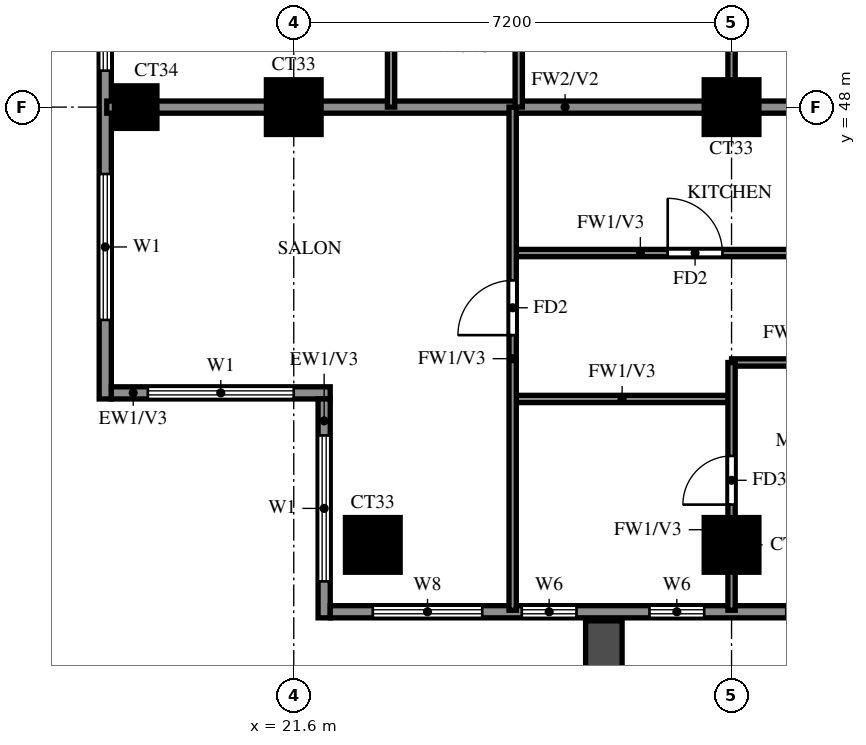
"""IFC4 building model, lengths in metres.
Left out: names, types, materials, properties, quantities, classifications, styles, units other than length and angle.
Written with IfcOpenShell. Run it as: python <this file> out.ifc"""

import sys

from ifc_helpers import new_model, si_unit, direction, frame, frame_2d, origin, origin_2d, place, context, subcontext, project, spatial, rectangle, extrude, source, transform, mapped, element, fill, save


model = new_model("IFC4")
c1 = context("Model", 3, precision=1e-05, world=origin(), true_north=direction((0.0, 1.0)))
c2 = subcontext(c1, "Body", "Model", "MODEL_VIEW")
j1 = project(units=[si_unit("LENGTHUNIT", "METRE"), si_unit("PLANEANGLEUNIT", "RADIAN")], contexts=[c1])
p1 = place(None, origin())
s1 = spatial("IfcSite", under=j1, at=p1, CompositionType="ELEMENT")
p2 = place(p1, origin())
s2 = spatial("IfcBuilding", under=s1, at=p2, CompositionType="ELEMENT")
p3 = place(p2, frame((0.0, 0.0, 218.5)))
s3 = spatial("IfcBuildingStorey", under=s2, at=p3, CompositionType="ELEMENT", Elevation=218.5)
m1 = source(origin(), c2, "Body", "SweptSolid", [
    extrude(rectangle(XDim=0.9, YDim=0.9, at=origin_2d()), origin(), (0.0, 0.0, 1.0), 3.22),
])
for number, where, z_axis, x_axis in (
    (1, (22.9, 40.8, 0.0), (0.0, 0.0, 1.0), (1.0, 0.0, 0.0)),
    (2, (28.8, 40.8, 0.0), (0.0, 0.0, 1.0), (1.0, 0.0, 0.0)),
):
    element("IfcColumn", number, at=place(p3, frame(where, z_axis=z_axis, x_axis=x_axis)), inside=s3, PredefinedType="COLUMN", context=c2, shape_type="MappedRepresentation", body=[
        mapped(m1, transform((0.0, 0.0, 0.0))),
    ])
m2 = source(origin(), c2, "Body", "SweptSolid", [
    extrude(rectangle(XDim=0.7, YDim=0.7, at=origin_2d()), origin(), (0.0, 0.0, 1.0), 3.22),
])
p4 = place(p3, frame((19.0, 48.0, 0.0), z_axis=(0.0, 0.0, 1.0), x_axis=(1.0, 0.0, 0.0)))
e3 = element("IfcColumn", 3, at=p4, inside=s3, PredefinedType="COLUMN", context=c2, shape_type="MappedRepresentation", body=[
    mapped(m2, transform((0.0, 0.0, 0.0))),
])
for number, where, z_axis, x_axis in (
    (4, (21.6, 48.0, 0.0), (0.0, 0.0, 1.0), (1.0, 0.0, 0.0)),
    (5, (28.8, 48.0, 0.0), (0.0, 0.0, 1.0), (1.0, 0.0, 0.0)),
):
    element("IfcColumn", number, at=place(p3, frame(where, z_axis=z_axis, x_axis=x_axis)), inside=s3, PredefinedType="COLUMN", context=c2, shape_type="MappedRepresentation", body=[
        mapped(m1, transform((0.0, 0.0, 0.0))),
    ])
p5 = place(p3, frame((18.5, 76.6, 0.0), z_axis=(0.0, 0.0, 1.0), x_axis=(0.0, -1.0, 0.0)))
e6 = element("IfcWall", 6, at=p5, inside=s3, PredefinedType="SOLIDWALL", context=c2, shape_type="SweptSolid", body=[
    extrude(rectangle(XDim=33.4, YDim=0.2, at=frame_2d((16.7, 0.0))), origin(), (0.0, 0.0, 1.0), 3.22),
])
p6 = place(p5, frame((18.7, 0.0, 0.0)))
e7 = element("IfcOpeningElement", 7, at=p6, cuts=e6, PredefinedType="OPENING", context=c2, shape_type="SweptSolid", body=[
    extrude(rectangle(XDim=1.8, YDim=2.4, at=frame_2d((0.9, 1.2))), frame((0.0, 0.11, 0.0), z_axis=(0.0, -1.0, 0.0), x_axis=(1.0, 0.0, 0.0)), (0.0, 0.0, 1.0), 0.22),
])
p7 = place(p5, frame((29.7, 0.0, 0.6)))
e8 = element("IfcOpeningElement", 8, at=p7, cuts=e6, PredefinedType="OPENING", context=c2, shape_type="SweptSolid", body=[
    extrude(rectangle(XDim=2.4, YDim=2.4, at=frame_2d((1.2, 1.2))), frame((0.0, 0.11, 0.0), z_axis=(0.0, -1.0, 0.0), x_axis=(1.0, 0.0, 0.0)), (0.0, 0.0, 1.0), 0.22),
])
p8 = place(p5, frame((25.6, 0.0, 0.6)))
e9 = element("IfcOpeningElement", 9, at=p8, cuts=e6, PredefinedType="OPENING", context=c2, shape_type="SweptSolid", body=[
    extrude(rectangle(XDim=2.4, YDim=2.4, at=frame_2d((1.2, 1.2))), frame((0.0, 0.11, 0.0), z_axis=(0.0, -1.0, 0.0), x_axis=(1.0, 0.0, 0.0)), (0.0, 0.0, 1.0), 0.22),
])
p9 = place(p5, frame((21.7, 0.0, 0.6)))
e10 = element("IfcOpeningElement", 10, at=p9, cuts=e6, PredefinedType="OPENING", context=c2, shape_type="SweptSolid", body=[
    extrude(rectangle(XDim=1.2, YDim=2.4, at=frame_2d((0.6, 1.2))), frame((0.0, 0.11, 0.0), z_axis=(0.0, -1.0, 0.0), x_axis=(1.0, 0.0, 0.0)), (0.0, 0.0, 1.0), 0.22),
])
p10 = place(p5, frame((23.95, 0.0, 0.6)))
e11 = element("IfcOpeningElement", 11, at=p10, cuts=e6, PredefinedType="OPENING", context=c2, shape_type="SweptSolid", body=[
    extrude(rectangle(XDim=0.9, YDim=2.4, at=frame_2d((0.45, 1.2))), frame((0.0, 0.11, 0.0), z_axis=(0.0, -1.0, 0.0), x_axis=(1.0, 0.0, 0.0)), (0.0, 0.0, 1.0), 0.22),
])
p11 = place(p5, frame((14.5, 0.0, 0.6)))
e12 = element("IfcOpeningElement", 12, at=p11, cuts=e6, PredefinedType="OPENING", context=c2, shape_type="SweptSolid", body=[
    extrude(rectangle(XDim=1.8, YDim=2.4, at=frame_2d((0.9, 1.2))), frame((0.0, 0.11, 0.0), z_axis=(0.0, -1.0, 0.0), x_axis=(1.0, 0.0, 0.0)), (0.0, 0.0, 1.0), 0.22),
])
p12 = place(p5, frame((7.833, 0.0, 0.6)))
e13 = element("IfcOpeningElement", 13, at=p12, cuts=e6, PredefinedType="OPENING", context=c2, shape_type="SweptSolid", body=[
    extrude(rectangle(XDim=2.4, YDim=2.4, at=frame_2d((1.2, 1.2))), frame((0.0, 0.11, 0.0), z_axis=(0.0, -1.0, 0.0), x_axis=(1.0, 0.0, 0.0)), (0.0, 0.0, 1.0), 0.22),
])
p13 = place(p5, frame((10.967, 0.0, 0.6)))
e14 = element("IfcOpeningElement", 14, at=p13, cuts=e6, PredefinedType="OPENING", context=c2, shape_type="SweptSolid", body=[
    extrude(rectangle(XDim=2.4, YDim=2.4, at=frame_2d((1.2, 1.2))), frame((0.0, 0.11, 0.0), z_axis=(0.0, -1.0, 0.0), x_axis=(1.0, 0.0, 0.0)), (0.0, 0.0, 1.0), 0.22),
])
p14 = place(p5, frame((4.75, 0.0, 1.5)))
e15 = element("IfcOpeningElement", 15, at=p14, cuts=e6, PredefinedType="OPENING", context=c2, shape_type="SweptSolid", body=[
    extrude(rectangle(XDim=0.9, YDim=0.9, at=frame_2d((0.45, 0.45))), frame((0.0, 0.11, 0.0), z_axis=(0.0, -1.0, 0.0), x_axis=(1.0, 0.0, 0.0)), (0.0, 0.0, 1.0), 0.22),
])
p15 = place(p5, frame((0.6, 0.0, 0.6)))
e16 = element("IfcOpeningElement", 16, at=p15, cuts=e6, PredefinedType="OPENING", context=c2, shape_type="SweptSolid", body=[
    extrude(rectangle(XDim=2.4, YDim=2.4, at=frame_2d((1.2, 1.2))), frame((0.0, 0.11, 0.0), z_axis=(0.0, -1.0, 0.0), x_axis=(1.0, 0.0, 0.0)), (0.0, 0.0, 1.0), 0.22),
])
p16 = place(p3, frame((18.6, 43.3, 0.0), z_axis=(0.0, 0.0, 1.0), x_axis=(1.0, 0.0, 0.0)))
e17 = element("IfcWall", 17, at=p16, inside=s3, PredefinedType="SOLIDWALL", context=c2, shape_type="SweptSolid", body=[
    extrude(rectangle(XDim=3.6, YDim=0.2, at=frame_2d((1.8, 0.0))), origin(), (0.0, 0.0, 1.0), 3.22),
])
p17 = place(p16, frame((0.6, 0.0, 0.6)))
e18 = element("IfcOpeningElement", 18, at=p17, cuts=e17, PredefinedType="OPENING", context=c2, shape_type="SweptSolid", body=[
    extrude(rectangle(XDim=2.4, YDim=2.4, at=frame_2d((1.2, 1.2))), frame((0.0, 0.11, 0.0), z_axis=(0.0, -1.0, 0.0), x_axis=(1.0, 0.0, 0.0)), (0.0, 0.0, 1.0), 0.22),
])
p18 = place(p3, frame((22.1, 43.2, 0.0), z_axis=(0.0, 0.0, 1.0), x_axis=(0.0, -1.0, 0.0)))
e19 = element("IfcWall", 19, at=p18, inside=s3, PredefinedType="SOLIDWALL", context=c2, shape_type="SweptSolid", body=[
    extrude(rectangle(XDim=3.6, YDim=0.2, at=frame_2d((1.8, 0.0))), origin(), (0.0, 0.0, 1.0), 3.22),
])
p19 = place(p18, frame((0.6, 0.0, 0.6)))
e20 = element("IfcOpeningElement", 20, at=p19, cuts=e19, PredefinedType="OPENING", context=c2, shape_type="SweptSolid", body=[
    extrude(rectangle(XDim=2.4, YDim=2.4, at=frame_2d((1.2, 1.2))), frame((0.0, 0.11, 0.0), z_axis=(0.0, -1.0, 0.0), x_axis=(1.0, 0.0, 0.0)), (0.0, 0.0, 1.0), 0.22),
])
p20 = place(p3, frame((22.2, 39.7, 0.0), z_axis=(0.0, 0.0, 1.0), x_axis=(1.0, 0.0, 0.0)))
e21 = element("IfcWall", 21, at=p20, inside=s3, PredefinedType="SOLIDWALL", context=c2, shape_type="SweptSolid", body=[
    extrude(rectangle(XDim=19.8, YDim=0.2, at=frame_2d((9.9, 0.0))), origin(), (0.0, 0.0, 1.0), 3.22),
])
p21 = place(p20, frame((7.5, 0.0, 0.0)))
e22 = element("IfcOpeningElement", 22, at=p21, cuts=e21, PredefinedType="OPENING", context=c2, shape_type="SweptSolid", body=[
    extrude(rectangle(XDim=1.8, YDim=2.4, at=frame_2d((0.9, 1.2))), frame((0.0, 0.11, 0.0), z_axis=(0.0, -1.0, 0.0), x_axis=(1.0, 0.0, 0.0)), (0.0, 0.0, 1.0), 0.22),
])
p22 = place(p20, frame((0.7, 0.0, 0.6)))
e23 = element("IfcOpeningElement", 23, at=p22, cuts=e21, PredefinedType="OPENING", context=c2, shape_type="SweptSolid", body=[
    extrude(rectangle(XDim=1.8, YDim=2.4, at=frame_2d((0.9, 1.2))), frame((0.0, 0.11, 0.0), z_axis=(0.0, -1.0, 0.0), x_axis=(1.0, 0.0, 0.0)), (0.0, 0.0, 1.0), 0.22),
])
p23 = place(p20, frame((9.75, 0.0, 0.6)))
e24 = element("IfcOpeningElement", 24, at=p23, cuts=e21, PredefinedType="OPENING", context=c2, shape_type="SweptSolid", body=[
    extrude(rectangle(XDim=0.9, YDim=2.4, at=frame_2d((0.45, 1.2))), frame((0.0, 0.11, 0.0), z_axis=(0.0, -1.0, 0.0), x_axis=(1.0, 0.0, 0.0)), (0.0, 0.0, 1.0), 0.22),
])
p24 = place(p20, frame((3.15, 0.0, 1.5)))
e25 = element("IfcOpeningElement", 25, at=p24, cuts=e21, PredefinedType="OPENING", context=c2, shape_type="SweptSolid", body=[
    extrude(rectangle(XDim=0.9, YDim=0.9, at=frame_2d((0.45, 0.45))), frame((0.0, 0.11, 0.0), z_axis=(0.0, -1.0, 0.0), x_axis=(1.0, 0.0, 0.0)), (0.0, 0.0, 1.0), 0.22),
])
p25 = place(p20, frame((5.25, 0.0, 1.5)))
e26 = element("IfcOpeningElement", 26, at=p25, cuts=e21, PredefinedType="OPENING", context=c2, shape_type="SweptSolid", body=[
    extrude(rectangle(XDim=0.9, YDim=0.9, at=frame_2d((0.45, 0.45))), frame((0.0, 0.11, 0.0), z_axis=(0.0, -1.0, 0.0), x_axis=(1.0, 0.0, 0.0)), (0.0, 0.0, 1.0), 0.22),
])
p26 = place(p3, frame((26.7, 39.55, 0.0), z_axis=(0.0, 0.0, 1.0), x_axis=(0.0, -1.0, 0.0)))
e27 = element("IfcWall", 27, at=p26, inside=s3, PredefinedType="SOLIDWALL", context=c2, shape_type="SweptSolid", body=[
    extrude(rectangle(XDim=2.65, YDim=0.6, at=frame_2d((1.325, 0.0))), origin(), (0.0, 0.0, 1.0), 2.85),
])
p27 = place(p3, frame((18.525, 48.0, 0.0), z_axis=(0.0, 0.0, 1.0), x_axis=(1.0, 0.0, 0.0)))
e28 = element("IfcWall", 28, at=p27, inside=s3, PredefinedType="SOLIDWALL", context=c2, shape_type="SweptSolid", body=[
    extrude(rectangle(XDim=15.075, YDim=0.2, at=frame_2d((7.538, 0.0))), origin(), (0.0, 0.0, 1.0), 3.22),
])
p28 = place(p3, frame((25.2, 43.2, 0.0), z_axis=(0.0, 0.0, 1.0), x_axis=(1.0, 0.0, 0.0)))
e29 = element("IfcWall", 29, at=p28, inside=s3, PredefinedType="PARTITIONING", context=c2, shape_type="SweptSolid", body=[
    extrude(rectangle(XDim=3.6, YDim=0.12, at=frame_2d((1.8, 0.0))), origin(), (0.0, 0.0, 1.0), 3.22),
])
p29 = place(p3, frame((28.8, 43.8, 0.0), z_axis=(0.0, 0.0, 1.0), x_axis=(1.0, 0.0, 0.0)))
e30 = element("IfcWall", 30, at=p29, inside=s3, PredefinedType="PARTITIONING", context=c2, shape_type="SweptSolid", body=[
    extrude(rectangle(XDim=4.8, YDim=0.12, at=frame_2d((2.4, 0.0))), origin(), (0.0, 0.0, 1.0), 3.22),
])
p30 = place(p29, frame((1.95, 0.0, 0.0)))
e31 = element("IfcOpeningElement", 31, at=p30, cuts=e30, PredefinedType="OPENING", context=c2, shape_type="SweptSolid", body=[
    extrude(rectangle(XDim=0.9, YDim=2.1, at=frame_2d((0.45, 1.05))), frame((0.0, 0.07, 0.0), z_axis=(0.0, -1.0, 0.0), x_axis=(1.0, 0.0, 0.0)), (0.0, 0.0, 1.0), 0.14),
])
p31 = place(p3, frame((25.2, 45.6, 0.0), z_axis=(0.0, 0.0, 1.0), x_axis=(1.0, 0.0, 0.0)))
e32 = element("IfcWall", 32, at=p31, inside=s3, PredefinedType="PARTITIONING", context=c2, shape_type="SweptSolid", body=[
    extrude(rectangle(XDim=6.0, YDim=0.12, at=frame_2d((3.0, 0.0))), origin(), (0.0, 0.0, 1.0), 3.22),
])
p32 = place(p31, frame((2.55, 0.0, 0.0)))
e33 = element("IfcOpeningElement", 33, at=p32, cuts=e32, PredefinedType="OPENING", context=c2, shape_type="SweptSolid", body=[
    extrude(rectangle(XDim=0.9, YDim=2.1, at=frame_2d((0.45, 1.05))), frame((0.0, 0.07, 0.0), z_axis=(0.0, -1.0, 0.0), x_axis=(1.0, 0.0, 0.0)), (0.0, 0.0, 1.0), 0.14),
])
p33 = place(p3, frame((23.2, 48.0, 0.0), z_axis=(0.0, 0.0, 1.0), x_axis=(0.0, 1.0, 0.0)))
e34 = element("IfcWall", 34, at=p33, inside=s3, PredefinedType="PARTITIONING", context=c2, shape_type="SweptSolid", body=[
    extrude(rectangle(XDim=21.6, YDim=0.12, at=frame_2d((10.8, 0.0))), origin(), (0.0, 0.0, 1.0), 3.22),
])
p34 = place(p33, frame((1.35, 0.0, 0.0)))
e35 = element("IfcOpeningElement", 35, at=p34, cuts=e34, PredefinedType="OPENING", context=c2, shape_type="SweptSolid", body=[
    extrude(rectangle(XDim=0.9, YDim=2.1, at=frame_2d((0.45, 1.05))), frame((0.0, 0.07, 0.0), z_axis=(0.0, -1.0, 0.0), x_axis=(1.0, 0.0, 0.0)), (0.0, 0.0, 1.0), 0.14),
])
p35 = place(p33, frame((4.95, 0.0, 0.0)))
e36 = element("IfcOpeningElement", 36, at=p35, cuts=e34, PredefinedType="OPENING", context=c2, shape_type="SweptSolid", body=[
    extrude(rectangle(XDim=0.9, YDim=2.1, at=frame_2d((0.45, 1.05))), frame((0.0, 0.07, 0.0), z_axis=(0.0, -1.0, 0.0), x_axis=(1.0, 0.0, 0.0)), (0.0, 0.0, 1.0), 0.14),
])
p36 = place(p33, frame((8.25, 0.0, 0.0)))
e37 = element("IfcOpeningElement", 37, at=p36, cuts=e34, PredefinedType="OPENING", context=c2, shape_type="SweptSolid", body=[
    extrude(rectangle(XDim=1.5, YDim=2.1, at=frame_2d((0.75, 1.05))), frame((0.0, 0.07, 0.0), z_axis=(0.0, -1.0, 0.0), x_axis=(1.0, 0.0, 0.0)), (0.0, 0.0, 1.0), 0.14),
])
p37 = place(p33, frame((12.15, 0.0, 0.0)))
e38 = element("IfcOpeningElement", 38, at=p37, cuts=e34, PredefinedType="OPENING", context=c2, shape_type="SweptSolid", body=[
    extrude(rectangle(XDim=0.9, YDim=2.1, at=frame_2d((0.45, 1.05))), frame((0.0, 0.07, 0.0), z_axis=(0.0, -1.0, 0.0), x_axis=(1.0, 0.0, 0.0)), (0.0, 0.0, 1.0), 0.14),
])
p38 = place(p33, frame((17.55, 0.0, 0.0)))
e39 = element("IfcOpeningElement", 39, at=p38, cuts=e34, PredefinedType="OPENING", context=c2, shape_type="SweptSolid", body=[
    extrude(rectangle(XDim=0.9, YDim=2.1, at=frame_2d((0.45, 1.05))), frame((0.0, 0.07, 0.0), z_axis=(0.0, -1.0, 0.0), x_axis=(1.0, 0.0, 0.0)), (0.0, 0.0, 1.0), 0.14),
])
p39 = place(p3, frame((25.2, 39.725, 0.0), z_axis=(0.0, 0.0, 1.0), x_axis=(0.0, 1.0, 0.0)))
e40 = element("IfcWall", 40, at=p39, inside=s3, PredefinedType="PARTITIONING", context=c2, shape_type="SweptSolid", body=[
    extrude(rectangle(XDim=8.275, YDim=0.12, at=frame_2d((4.137, 0.0))), origin(), (0.0, 0.0, 1.0), 3.22),
])
p40 = place(p39, frame((4.525, 0.0, 0.0)))
e41 = element("IfcOpeningElement", 41, at=p40, cuts=e40, PredefinedType="OPENING", context=c2, shape_type="SweptSolid", body=[
    extrude(rectangle(XDim=0.9, YDim=2.1, at=frame_2d((0.45, 1.05))), frame((0.0, 0.07, 0.0), z_axis=(0.0, -1.0, 0.0), x_axis=(1.0, 0.0, 0.0)), (0.0, 0.0, 1.0), 0.14),
])
p41 = place(p3, frame((25.3, 48.0, 0.0), z_axis=(0.0, 0.0, 1.0), x_axis=(0.0, 1.0, 0.0)))
e42 = element("IfcWall", 42, at=p41, inside=s3, PredefinedType="PARTITIONING", context=c2, shape_type="SweptSolid", body=[
    extrude(rectangle(XDim=3.6, YDim=0.12, at=frame_2d((1.8, 0.0))), origin(), (0.0, 0.0, 1.0), 3.22),
])
p42 = place(p41, frame((1.35, 0.0, 0.0)))
e43 = element("IfcOpeningElement", 43, at=p42, cuts=e42, PredefinedType="OPENING", context=c2, shape_type="SweptSolid", body=[
    extrude(rectangle(XDim=0.9, YDim=2.1, at=frame_2d((0.45, 1.05))), frame((0.0, 0.07, 0.0), z_axis=(0.0, -1.0, 0.0), x_axis=(1.0, 0.0, 0.0)), (0.0, 0.0, 1.0), 0.14),
])
p43 = place(p3, frame((28.8, 39.725, 0.0), z_axis=(0.0, 0.0, 1.0), x_axis=(0.0, 1.0, 0.0)))
e44 = element("IfcWall", 44, at=p43, inside=s3, PredefinedType="PARTITIONING", context=c2, shape_type="SweptSolid", body=[
    extrude(rectangle(XDim=4.075, YDim=0.12, at=frame_2d((2.038, 0.0))), origin(), (0.0, 0.0, 1.0), 3.22),
])
p44 = place(p43, frame((1.738, 0.0, 0.0)))
e45 = element("IfcOpeningElement", 45, at=p44, cuts=e44, PredefinedType="OPENING", context=c2, shape_type="SweptSolid", body=[
    extrude(rectangle(XDim=0.8, YDim=2.1, at=frame_2d((0.4, 1.05))), frame((0.0, 0.07, 0.0), z_axis=(0.0, -1.0, 0.0), x_axis=(1.0, 0.0, 0.0)), (0.0, 0.0, 1.0), 0.14),
])
p45 = place(p3, frame((28.8, 48.0, 0.0), z_axis=(0.0, 0.0, 1.0), x_axis=(0.0, 1.0, 0.0)))
e46 = element("IfcWall", 46, at=p45, inside=s3, PredefinedType="PARTITIONING", context=c2, shape_type="SweptSolid", body=[
    extrude(rectangle(XDim=3.6, YDim=0.12, at=frame_2d((1.8, 0.0))), origin(), (0.0, 0.0, 1.0), 3.22),
])
p46 = place(p7, origin())
e47 = element("IfcWindow", 47, at=p46, inside=s3, PartitioningType="DOUBLE_PANEL_VERTICAL", PredefinedType="WINDOW", context=c2, shape_type="SweptSolid", body=[
    extrude(rectangle(XDim=2.4, YDim=2.4, at=frame_2d((1.2, 1.2))), frame((0.0, 0.03, 0.0), z_axis=(0.0, -1.0, 0.0), x_axis=(1.0, 0.0, 0.0)), (0.0, 0.0, 1.0), 0.06),
])
fill(e8, e47)
p47 = place(p8, origin())
e48 = element("IfcWindow", 48, at=p47, inside=s3, PartitioningType="DOUBLE_PANEL_VERTICAL", PredefinedType="WINDOW", context=c2, shape_type="SweptSolid", body=[
    extrude(rectangle(XDim=2.4, YDim=2.4, at=frame_2d((1.2, 1.2))), frame((0.0, 0.03, 0.0), z_axis=(0.0, -1.0, 0.0), x_axis=(1.0, 0.0, 0.0)), (0.0, 0.0, 1.0), 0.06),
])
fill(e9, e48)
p48 = place(p17, origin())
e49 = element("IfcWindow", 49, at=p48, inside=s3, PartitioningType="DOUBLE_PANEL_VERTICAL", PredefinedType="WINDOW", context=c2, shape_type="SweptSolid", body=[
    extrude(rectangle(XDim=2.4, YDim=2.4, at=frame_2d((1.2, 1.2))), frame((0.0, 0.03, 0.0), z_axis=(0.0, -1.0, 0.0), x_axis=(1.0, 0.0, 0.0)), (0.0, 0.0, 1.0), 0.06),
])
fill(e18, e49)
p49 = place(p19, origin())
e50 = element("IfcWindow", 50, at=p49, inside=s3, PartitioningType="DOUBLE_PANEL_VERTICAL", PredefinedType="WINDOW", context=c2, shape_type="SweptSolid", body=[
    extrude(rectangle(XDim=2.4, YDim=2.4, at=frame_2d((1.2, 1.2))), frame((0.0, 0.03, 0.0), z_axis=(0.0, -1.0, 0.0), x_axis=(1.0, 0.0, 0.0)), (0.0, 0.0, 1.0), 0.06),
])
fill(e20, e50)
p50 = place(p21, origin())
e51 = element("IfcDoor", 51, at=p50, inside=s3, OperationType="DOUBLE_DOOR_SLIDING", PredefinedType="DOOR", context=c2, shape_type="SweptSolid", body=[
    extrude(rectangle(XDim=1.8, YDim=2.4, at=frame_2d((0.9, 1.2))), frame((0.0, 0.025, 0.0), z_axis=(0.0, -1.0, 0.0), x_axis=(1.0, 0.0, 0.0)), (0.0, 0.0, 1.0), 0.05),
])
fill(e22, e51)
p51 = place(p22, origin())
e52 = element("IfcWindow", 52, at=p51, inside=s3, PartitioningType="DOUBLE_PANEL_VERTICAL", PredefinedType="WINDOW", context=c2, shape_type="SweptSolid", body=[
    extrude(rectangle(XDim=1.8, YDim=2.4, at=frame_2d((0.9, 1.2))), frame((0.0, 0.03, 0.0), z_axis=(0.0, -1.0, 0.0), x_axis=(1.0, 0.0, 0.0)), (0.0, 0.0, 1.0), 0.06),
])
fill(e23, e52)
p52 = place(p24, origin())
e53 = element("IfcWindow", 53, at=p52, inside=s3, PartitioningType="SINGLE_PANEL", PredefinedType="WINDOW", context=c2, shape_type="SweptSolid", body=[
    extrude(rectangle(XDim=0.9, YDim=0.9, at=frame_2d((0.45, 0.45))), frame((0.0, 0.03, 0.0), z_axis=(0.0, -1.0, 0.0), x_axis=(1.0, 0.0, 0.0)), (0.0, 0.0, 1.0), 0.06),
])
fill(e25, e53)
p53 = place(p25, origin())
e54 = element("IfcWindow", 54, at=p53, inside=s3, PartitioningType="SINGLE_PANEL", PredefinedType="WINDOW", context=c2, shape_type="SweptSolid", body=[
    extrude(rectangle(XDim=0.9, YDim=0.9, at=frame_2d((0.45, 0.45))), frame((0.0, 0.03, 0.0), z_axis=(0.0, -1.0, 0.0), x_axis=(1.0, 0.0, 0.0)), (0.0, 0.0, 1.0), 0.06),
])
fill(e26, e54)
p54 = place(p40, origin())
e55 = element("IfcDoor", 55, at=p54, inside=s3, OperationType="SINGLE_SWING_LEFT", PredefinedType="DOOR", context=c2, shape_type="SweptSolid", body=[
    extrude(rectangle(XDim=0.9, YDim=2.1, at=frame_2d((0.45, 1.05))), frame((0.0, 0.025, 0.0), z_axis=(0.0, -1.0, 0.0), x_axis=(1.0, 0.0, 0.0)), (0.0, 0.0, 1.0), 0.05),
])
fill(e41, e55)
p55 = place(p44, origin())
e56 = element("IfcDoor", 56, at=p55, inside=s3, OperationType="SINGLE_SWING_RIGHT", PredefinedType="DOOR", context=c2, shape_type="SweptSolid", body=[
    extrude(rectangle(XDim=0.8, YDim=2.1, at=frame_2d((0.4, 1.05))), frame((0.0, 0.025, 0.0), z_axis=(0.0, -1.0, 0.0), x_axis=(1.0, 0.0, 0.0)), (0.0, 0.0, 1.0), 0.05),
])
fill(e45, e56)
p56 = place(p32, origin())
e57 = element("IfcDoor", 57, at=p56, inside=s3, OperationType="SINGLE_SWING_LEFT", PredefinedType="DOOR", context=c2, shape_type="SweptSolid", body=[
    extrude(rectangle(XDim=0.9, YDim=2.1, at=frame_2d((0.45, 1.05))), frame((0.0, 0.025, 0.0), z_axis=(0.0, -1.0, 0.0), x_axis=(1.0, 0.0, 0.0)), (0.0, 0.0, 1.0), 0.05),
])
fill(e33, e57)
save(model, sys.argv[1])
